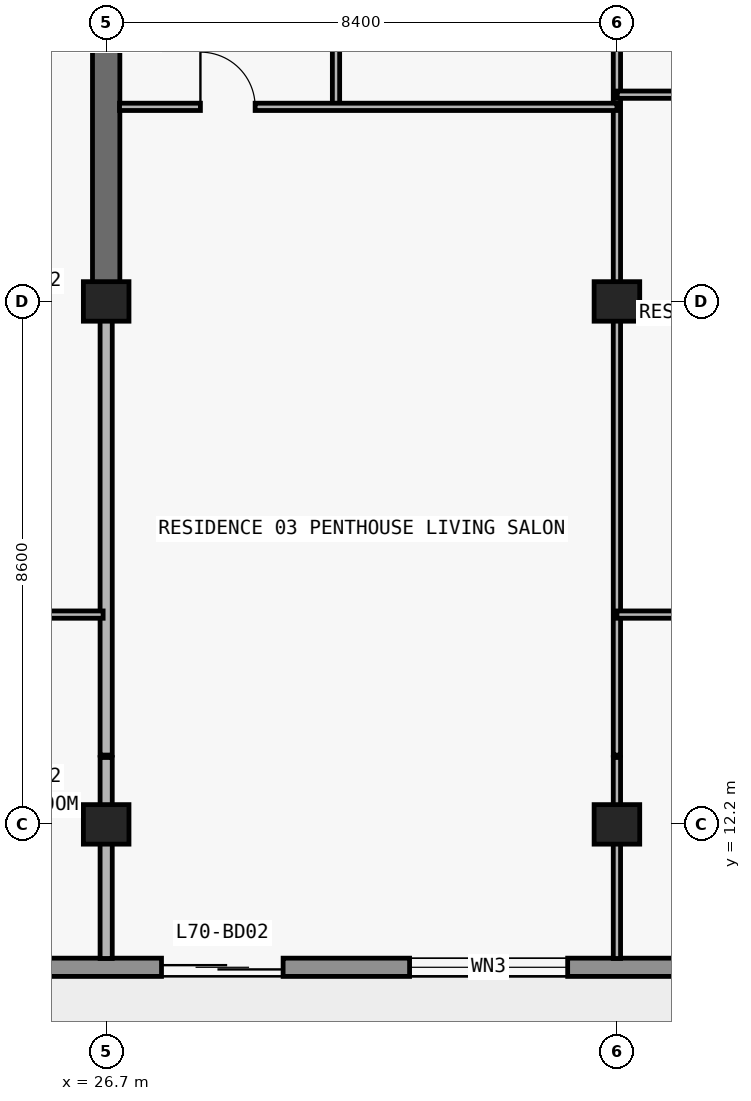
"""IFC4 building model, lengths in metres.
Left out: names, types, materials, properties, quantities, classifications, styles, units other than length and angle.
Written with IfcOpenShell. Run it as: python <this file> out.ifc"""

import sys

from ifc_helpers import new_model, si_unit, direction, frame, frame_2d, origin, origin_2d, place, context, subcontext, project, spatial, rectangle, extrude, element, fill, save


model = new_model("IFC4")
c1 = context("Model", 3, precision=1e-05, world=origin(), true_north=direction((0.0, 1.0)))
c2 = subcontext(c1, "Body", "Model", "MODEL_VIEW")
j1 = project(units=[si_unit("LENGTHUNIT", "METRE"), si_unit("PLANEANGLEUNIT", "RADIAN")], contexts=[c1])
p1 = place(None, origin())
s1 = spatial("IfcSite", under=j1, at=p1, CompositionType="ELEMENT")
p2 = place(p1, origin())
s2 = spatial("IfcBuilding", under=s1, at=p2, CompositionType="ELEMENT")
p3 = place(p2, frame((0.0, 0.0, 249.6)))
s3 = spatial("IfcBuildingStorey", under=s2, at=p3, CompositionType="ELEMENT", Elevation=249.6)
for number, where, z_axis, x_axis in (
    (1, (26.7, 12.2, 0.0), (0.0, 0.0, 1.0), (1.0, 0.0, 0.0)),
    (2, (35.1, 12.2, 0.0), (0.0, 0.0, 1.0), (1.0, 0.0, 0.0)),
    (3, (26.7, 20.8, 0.0), (0.0, 0.0, 1.0), (1.0, 0.0, 0.0)),
    (4, (35.1, 20.8, 0.0), (0.0, 0.0, 1.0), (1.0, 0.0, 0.0)),
):
    element("IfcColumn", number, at=place(p3, frame(where, z_axis=z_axis, x_axis=x_axis)), inside=s3, PredefinedType="COLUMN", context=c2, shape_type="SweptSolid", body=[
        extrude(rectangle(XDim=0.75, YDim=0.65, at=origin_2d()), origin(), (0.0, 0.0, 1.0), 3.05),
    ])
p4 = place(p3, frame((26.7, 20.8, 0.0), z_axis=(0.0, 0.0, 1.0), x_axis=(0.0, 1.0, 0.0)))
e5 = element("IfcWall", 5, at=p4, inside=s3, PredefinedType="SHEAR", context=c2, shape_type="SweptSolid", body=[
    extrude(rectangle(XDim=8.6, YDim=0.45, at=frame_2d((4.3, 0.0))), origin(), (0.0, 0.0, 1.0), 3.05),
])
p5 = place(p3, frame((65.7, 9.85, 0.0), z_axis=(0.0, 0.0, 1.0), x_axis=(-1.0, 0.0, 0.0)))
e6 = element("IfcWall", 6, at=p5, inside=s3, PredefinedType="STANDARD", context=c2, shape_type="SweptSolid", body=[
    extrude(rectangle(XDim=53.6, YDim=0.3, at=frame_2d((26.8, 0.0))), origin(), (0.0, 0.0, 1.0), 3.05),
])
p6 = place(p5, frame((48.05, 0.0, 0.85)))
e7 = element("IfcOpeningElement", 7, at=p6, cuts=e6, PredefinedType="OPENING", context=c2, shape_type="SweptSolid", body=[
    extrude(rectangle(XDim=1.8, YDim=1.55, at=frame_2d((0.9, 0.775))), frame((0.0, 0.16, 0.0), z_axis=(0.0, -1.0, 0.0), x_axis=(1.0, 0.0, 0.0)), (0.0, 0.0, 1.0), 0.32),
])
p7 = place(p5, frame((44.09, 0.0, 0.0)))
e8 = element("IfcOpeningElement", 8, at=p7, cuts=e6, PredefinedType="OPENING", context=c2, shape_type="SweptSolid", body=[
    extrude(rectangle(XDim=2.0, YDim=2.3, at=frame_2d((1.0, 1.15))), frame((0.0, 0.16, 0.0), z_axis=(0.0, -1.0, 0.0), x_axis=(1.0, 0.0, 0.0)), (0.0, 0.0, 1.0), 0.32),
])
p8 = place(p5, frame((39.99, 0.0, 0.85)))
e9 = element("IfcOpeningElement", 9, at=p8, cuts=e6, PredefinedType="OPENING", context=c2, shape_type="SweptSolid", body=[
    extrude(rectangle(XDim=1.8, YDim=1.55, at=frame_2d((0.9, 0.775))), frame((0.0, 0.16, 0.0), z_axis=(0.0, -1.0, 0.0), x_axis=(1.0, 0.0, 0.0)), (0.0, 0.0, 1.0), 0.32),
])
p9 = place(p5, frame((36.09, 0.0, 0.0)))
e10 = element("IfcOpeningElement", 10, at=p9, cuts=e6, PredefinedType="OPENING", context=c2, shape_type="SweptSolid", body=[
    extrude(rectangle(XDim=2.0, YDim=2.3, at=frame_2d((1.0, 1.15))), frame((0.0, 0.16, 0.0), z_axis=(0.0, -1.0, 0.0), x_axis=(1.0, 0.0, 0.0)), (0.0, 0.0, 1.0), 0.32),
])
p10 = place(p5, frame((31.41, 0.0, 0.65)))
e11 = element("IfcOpeningElement", 11, at=p10, cuts=e6, PredefinedType="OPENING", context=c2, shape_type="SweptSolid", body=[
    extrude(rectangle(XDim=2.6, YDim=1.85, at=frame_2d((1.3, 0.925))), frame((0.0, 0.16, 0.0), z_axis=(0.0, -1.0, 0.0), x_axis=(1.0, 0.0, 0.0)), (0.0, 0.0, 1.0), 0.32),
])
p11 = place(p5, frame((25.7, 0.0, 0.85)))
e12 = element("IfcOpeningElement", 12, at=p11, cuts=e6, PredefinedType="OPENING", context=c2, shape_type="SweptSolid", body=[
    extrude(rectangle(XDim=2.2, YDim=1.55, at=frame_2d((1.1, 0.775))), frame((0.0, 0.16, 0.0), z_axis=(0.0, -1.0, 0.0), x_axis=(1.0, 0.0, 0.0)), (0.0, 0.0, 1.0), 0.32),
])
p12 = place(p5, frame((17.7, 0.0, 0.85)))
e13 = element("IfcOpeningElement", 13, at=p12, cuts=e6, PredefinedType="OPENING", context=c2, shape_type="SweptSolid", body=[
    extrude(rectangle(XDim=2.2, YDim=1.55, at=frame_2d((1.1, 0.775))), frame((0.0, 0.16, 0.0), z_axis=(0.0, -1.0, 0.0), x_axis=(1.0, 0.0, 0.0)), (0.0, 0.0, 1.0), 0.32),
])
p13 = place(p5, frame((11.69, 0.0, 0.0)))
e14 = element("IfcOpeningElement", 14, at=p13, cuts=e6, PredefinedType="OPENING", context=c2, shape_type="SweptSolid", body=[
    extrude(rectangle(XDim=2.0, YDim=2.3, at=frame_2d((1.0, 1.15))), frame((0.0, 0.16, 0.0), z_axis=(0.0, -1.0, 0.0), x_axis=(1.0, 0.0, 0.0)), (0.0, 0.0, 1.0), 0.32),
])
p14 = place(p5, frame((7.01, 0.0, 0.65)))
e15 = element("IfcOpeningElement", 15, at=p14, cuts=e6, PredefinedType="OPENING", context=c2, shape_type="SweptSolid", body=[
    extrude(rectangle(XDim=2.6, YDim=1.85, at=frame_2d((1.3, 0.925))), frame((0.0, 0.16, 0.0), z_axis=(0.0, -1.0, 0.0), x_axis=(1.0, 0.0, 0.0)), (0.0, 0.0, 1.0), 0.32),
])
p15 = place(p5, frame((2.0, 0.0, 0.85)))
e16 = element("IfcOpeningElement", 16, at=p15, cuts=e6, PredefinedType="OPENING", context=c2, shape_type="SweptSolid", body=[
    extrude(rectangle(XDim=2.2, YDim=1.55, at=frame_2d((1.1, 0.775))), frame((0.0, 0.16, 0.0), z_axis=(0.0, -1.0, 0.0), x_axis=(1.0, 0.0, 0.0)), (0.0, 0.0, 1.0), 0.32),
])
p16 = place(p3, frame((26.7, 9.995, 0.0), z_axis=(0.0, 0.0, 1.0), x_axis=(0.0, 1.0, 0.0)))
e17 = element("IfcWall", 17, at=p16, inside=s3, PredefinedType="PARTITIONING", context=c2, shape_type="SweptSolid", body=[
    extrude(rectangle(XDim=3.305, YDim=0.2, at=frame_2d((1.652, 0.0))), origin(), (0.0, 0.0, 1.0), 2.263),
])
p17 = place(p3, frame((26.7, 13.34, 0.0), z_axis=(0.0, 0.0, 1.0), x_axis=(0.0, 1.0, 0.0)))
e18 = element("IfcWall", 18, at=p17, inside=s3, PredefinedType="PARTITIONING", context=c2, shape_type="SweptSolid", body=[
    extrude(rectangle(XDim=7.455, YDim=0.2, at=frame_2d((3.728, 0.0))), origin(), (0.0, 0.0, 1.0), 2.263),
])
p18 = place(p3, frame((30.48, 24.0, 0.0), z_axis=(0.0, 0.0, 1.0), x_axis=(0.0, 1.0, 0.0)))
e19 = element("IfcWall", 19, at=p18, inside=s3, PredefinedType="PARTITIONING", context=c2, shape_type="SweptSolid", body=[
    extrude(rectangle(XDim=4.8, YDim=0.12, at=frame_2d((2.4, 0.0))), origin(), (0.0, 0.0, 1.0), 3.05),
])
p19 = place(p18, frame((1.95, 0.0, 0.0)))
e20 = element("IfcOpeningElement", 20, at=p19, cuts=e19, PredefinedType="OPENING", context=c2, shape_type="SweptSolid", body=[
    extrude(rectangle(XDim=0.9, YDim=2.15, at=frame_2d((0.45, 1.075))), frame((0.0, 0.07, 0.0), z_axis=(0.0, -1.0, 0.0), x_axis=(1.0, 0.0, 0.0)), (0.0, 0.0, 1.0), 0.14),
])
p20 = place(p3, frame((35.1, 9.995, 0.0), z_axis=(0.0, 0.0, 1.0), x_axis=(0.0, 1.0, 0.0)))
e21 = element("IfcWall", 21, at=p20, inside=s3, PredefinedType="PARTITIONING", context=c2, shape_type="SweptSolid", body=[
    extrude(rectangle(XDim=3.305, YDim=0.12, at=frame_2d((1.652, 0.0))), origin(), (0.0, 0.0, 1.0), 2.263),
])
p21 = place(p3, frame((35.1, 13.34, 0.0), z_axis=(0.0, 0.0, 1.0), x_axis=(0.0, 1.0, 0.0)))
e22 = element("IfcWall", 22, at=p21, inside=s3, PredefinedType="PARTITIONING", context=c2, shape_type="SweptSolid", body=[
    extrude(rectangle(XDim=16.8, YDim=0.12, at=frame_2d((8.4, 0.0))), origin(), (0.0, 0.0, 1.0), 2.263),
])
p22 = place(p21, frame((12.61, 0.0, 0.0)))
e23 = element("IfcOpeningElement", 23, at=p22, cuts=e22, PredefinedType="OPENING", context=c2, shape_type="SweptSolid", body=[
    extrude(rectangle(XDim=0.9, YDim=2.15, at=frame_2d((0.45, 1.075))), frame((0.0, 0.07, 0.0), z_axis=(0.0, -1.0, 0.0), x_axis=(1.0, 0.0, 0.0)), (0.0, 0.0, 1.0), 0.14),
])
p23 = place(p3, frame((22.92, 15.65, 0.0), z_axis=(0.0, 0.0, 1.0), x_axis=(1.0, 0.0, 0.0)))
e24 = element("IfcWall", 24, at=p23, inside=s3, PredefinedType="PARTITIONING", context=c2, shape_type="SweptSolid", body=[
    extrude(rectangle(XDim=3.73, YDim=0.12, at=frame_2d((1.865, 0.0))), origin(), (0.0, 0.0, 1.0), 3.05),
])
p24 = place(p23, frame((1.415, 0.0, 0.0)))
e25 = element("IfcOpeningElement", 25, at=p24, cuts=e24, PredefinedType="OPENING", context=c2, shape_type="SweptSolid", body=[
    extrude(rectangle(XDim=0.9, YDim=2.15, at=frame_2d((0.45, 1.075))), frame((0.0, 0.07, 0.0), z_axis=(0.0, -1.0, 0.0), x_axis=(1.0, 0.0, 0.0)), (0.0, 0.0, 1.0), 0.14),
])
p25 = place(p3, frame((35.1, 15.65, 0.0), z_axis=(0.0, 0.0, 1.0), x_axis=(1.0, 0.0, 0.0)))
e26 = element("IfcWall", 26, at=p25, inside=s3, PredefinedType="PARTITIONING", context=c2, shape_type="SweptSolid", body=[
    extrude(rectangle(XDim=16.0, YDim=0.12, at=frame_2d((8.0, 0.0))), origin(), (0.0, 0.0, 1.0), 3.05),
])
p26 = place(p25, frame((3.35, 0.0, 0.0)))
e27 = element("IfcOpeningElement", 27, at=p26, cuts=e26, PredefinedType="OPENING", context=c2, shape_type="SweptSolid", body=[
    extrude(rectangle(XDim=0.9, YDim=2.15, at=frame_2d((0.45, 1.075))), frame((0.0, 0.07, 0.0), z_axis=(0.0, -1.0, 0.0), x_axis=(1.0, 0.0, 0.0)), (0.0, 0.0, 1.0), 0.14),
])
p27 = place(p25, frame((11.35, 0.0, 0.0)))
e28 = element("IfcOpeningElement", 28, at=p27, cuts=e26, PredefinedType="OPENING", context=c2, shape_type="SweptSolid", body=[
    extrude(rectangle(XDim=0.9, YDim=2.15, at=frame_2d((0.45, 1.075))), frame((0.0, 0.07, 0.0), z_axis=(0.0, -1.0, 0.0), x_axis=(1.0, 0.0, 0.0)), (0.0, 0.0, 1.0), 0.14),
])
p28 = place(p3, frame((26.92, 24.0, 0.0), z_axis=(0.0, 0.0, 1.0), x_axis=(1.0, 0.0, 0.0)))
e29 = element("IfcWall", 29, at=p28, inside=s3, PredefinedType="PARTITIONING", context=c2, shape_type="SweptSolid", body=[
    extrude(rectangle(XDim=8.18, YDim=0.12, at=frame_2d((4.09, 0.0))), origin(), (0.0, 0.0, 1.0), 3.05),
])
p29 = place(p28, frame((1.33, 0.0, 0.0)))
e30 = element("IfcOpeningElement", 30, at=p29, cuts=e29, PredefinedType="OPENING", context=c2, shape_type="SweptSolid", body=[
    extrude(rectangle(XDim=0.9, YDim=2.15, at=frame_2d((0.45, 1.075))), frame((0.0, 0.07, 0.0), z_axis=(0.0, -1.0, 0.0), x_axis=(1.0, 0.0, 0.0)), (0.0, 0.0, 1.0), 0.14),
])
p30 = place(p3, frame((35.105, 24.2, 0.0), z_axis=(0.0, 0.0, 1.0), x_axis=(1.0, 0.0, 0.0)))
e31 = element("IfcWall", 31, at=p30, inside=s3, PredefinedType="PARTITIONING", context=c2, shape_type="SweptSolid", body=[
    extrude(rectangle(XDim=7.59, YDim=0.12, at=frame_2d((3.795, 0.0))), origin(), (0.0, 0.0, 1.0), 3.05),
])
p31 = place(p30, frame((3.345, 0.0, 0.0)))
e32 = element("IfcOpeningElement", 32, at=p31, cuts=e31, PredefinedType="OPENING", context=c2, shape_type="SweptSolid", body=[
    extrude(rectangle(XDim=0.9, YDim=2.15, at=frame_2d((0.45, 1.075))), frame((0.0, 0.07, 0.0), z_axis=(0.0, -1.0, 0.0), x_axis=(1.0, 0.0, 0.0)), (0.0, 0.0, 1.0), 0.14),
])
p32 = place(p9, origin())
e33 = element("IfcDoor", 33, at=p32, inside=s3, OperationType="DOUBLE_DOOR_SLIDING", PredefinedType="DOOR", context=c2, shape_type="SweptSolid", body=[
    extrude(rectangle(XDim=2.0, YDim=2.3, at=frame_2d((1.0, 1.15))), frame((0.0, 0.025, 0.0), z_axis=(0.0, -1.0, 0.0), x_axis=(1.0, 0.0, 0.0)), (0.0, 0.0, 1.0), 0.05),
])
fill(e10, e33)
p33 = place(p10, origin())
e34 = element("IfcWindow", 34, at=p33, inside=s3, PartitioningType="SINGLE_PANEL", PredefinedType="WINDOW", context=c2, shape_type="SweptSolid", body=[
    extrude(rectangle(XDim=2.6, YDim=1.85, at=frame_2d((1.3, 0.925))), frame((0.0, 0.03, 0.0), z_axis=(0.0, -1.0, 0.0), x_axis=(1.0, 0.0, 0.0)), (0.0, 0.0, 1.0), 0.06),
])
fill(e11, e34)
p34 = place(p29, origin())
e35 = element("IfcDoor", 35, at=p34, inside=s3, OperationType="SINGLE_SWING_LEFT", PredefinedType="DOOR", context=c2, shape_type="SweptSolid", body=[
    extrude(rectangle(XDim=0.9, YDim=2.15, at=frame_2d((0.45, 1.075))), frame((0.0, 0.025, 0.0), z_axis=(0.0, -1.0, 0.0), x_axis=(1.0, 0.0, 0.0)), (0.0, 0.0, 1.0), 0.05),
])
fill(e30, e35)
save(model, sys.argv[1])
